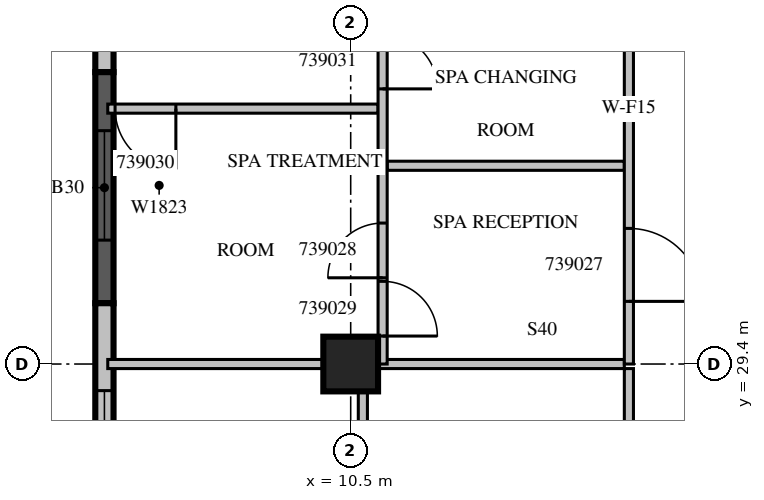
"""IFC4 building model, lengths in metres.
Left out: names, types, materials, properties, quantities, classifications, styles, units other than length and angle.
Written with IfcOpenShell. Run it as: python <this file> out.ifc"""

import sys

from ifc_helpers import new_model, si_unit, direction, frame, frame_2d, origin, origin_2d, place, context, subcontext, project, spatial, rectangle, extrude, source, transform, mapped, element, fill, save


model = new_model("IFC4")
c1 = context("Model", 3, precision=1e-05, world=origin(), true_north=direction((0.0, 1.0)))
c2 = subcontext(c1, "Body", "Model", "MODEL_VIEW")
j1 = project(units=[si_unit("LENGTHUNIT", "METRE"), si_unit("PLANEANGLEUNIT", "RADIAN")], contexts=[c1])
p1 = place(None, origin())
s1 = spatial("IfcSite", under=j1, at=p1, CompositionType="ELEMENT")
p2 = place(p1, origin())
s2 = spatial("IfcBuilding", under=s1, at=p2, CompositionType="ELEMENT")
p3 = place(p2, frame((0.0, 0.0, 181.6)))
s3 = spatial("IfcBuildingStorey", under=s2, at=p3, CompositionType="ELEMENT", Elevation=181.6)
m1 = source(origin(), c2, "Body", "SweptSolid", [
    extrude(rectangle(XDim=0.9, YDim=0.9, at=origin_2d()), origin(), (0.0, 0.0, 1.0), 3.8),
])
p4 = place(p3, frame((10.5, 29.4, 0.0), z_axis=(0.0, 0.0, 1.0), x_axis=(1.0, 0.0, 0.0)))
e1 = element("IfcColumn", 1, at=p4, inside=s3, PredefinedType="COLUMN", context=c2, shape_type="MappedRepresentation", body=[
    mapped(m1, transform((0.0, 0.0, 0.0), scale=1.0)),
])
m2 = source(origin(), c2, "Body", "SweptSolid", [
    extrude(rectangle(XDim=4.2, YDim=0.3, at=frame_2d((2.1, 0.0))), origin(), (0.0, 0.0, 1.0), 3.4),
])
p5 = place(p3, frame((6.45, 38.4, 0.0), z_axis=(0.0, 0.0, 1.0), x_axis=(0.0, -1.0, 0.0)))
e2 = element("IfcWall", 2, at=p5, inside=s3, PredefinedType="STANDARD", context=c2, shape_type="MappedRepresentation", body=[
    mapped(m2, transform((0.0, 0.0, 0.0), scale=1.0)),
])
m3 = source(origin(), c2, "Body", "SweptSolid", [
    extrude(rectangle(XDim=1.8, YDim=2.3, at=frame_2d((0.9, 1.15))), frame((0.0, 0.16, 0.0), z_axis=(0.0, -1.0, 0.0), x_axis=(1.0, 0.0, 0.0)), (0.0, 0.0, 1.0), 0.32),
])
p6 = place(p5, frame((1.15, 0.0, 0.6)))
e3 = element("IfcOpeningElement", 3, at=p6, cuts=e2, PredefinedType="OPENING", context=c2, shape_type="MappedRepresentation", body=[
    mapped(m3, transform((0.0, 0.0, 0.0), scale=1.0)),
])
m4 = source(origin(), c2, "Body", "SweptSolid", [
    extrude(rectangle(XDim=3.8, YDim=0.3, at=frame_2d((1.9, 0.0))), origin(), (0.0, 0.0, 1.0), 3.4),
])
p7 = place(p3, frame((6.45, 34.2, 0.0), z_axis=(0.0, 0.0, 1.0), x_axis=(0.0, -1.0, 0.0)))
e4 = element("IfcWall", 4, at=p7, inside=s3, PredefinedType="SOLIDWALL", context=c2, shape_type="MappedRepresentation", body=[
    mapped(m4, transform((0.0, 0.0, 0.0), scale=1.0)),
])
p8 = place(p7, frame((0.963, 0.0, 0.6)))
e5 = element("IfcOpeningElement", 5, at=p8, cuts=e4, PredefinedType="OPENING", context=c2, shape_type="MappedRepresentation", body=[
    mapped(m3, transform((0.0, 0.0, 0.0), scale=1.0)),
])
p9 = place(p3, frame((6.45, 30.4, 0.0), z_axis=(0.0, 0.0, 1.0), x_axis=(0.0, -1.0, 0.0)))
e6 = element("IfcWall", 6, at=p9, inside=s3, PredefinedType="STANDARD", context=c2, shape_type="SweptSolid", body=[
    extrude(rectangle(XDim=8.6, YDim=0.3, at=frame_2d((4.3, 0.0))), origin(), (0.0, 0.0, 1.0), 3.4),
])
p10 = place(p9, frame((1.438, 0.0, 0.6)))
e7 = element("IfcOpeningElement", 7, at=p10, cuts=e6, PredefinedType="OPENING", context=c2, shape_type="MappedRepresentation", body=[
    mapped(m3, transform((0.0, 0.0, 0.0), scale=1.0)),
])
m5 = source(origin(), c2, "Body", "SweptSolid", [
    extrude(rectangle(XDim=1.2, YDim=2.3, at=frame_2d((0.6, 1.15))), frame((0.0, 0.16, 0.0), z_axis=(0.0, -1.0, 0.0), x_axis=(1.0, 0.0, 0.0)), (0.0, 0.0, 1.0), 0.32),
])
p11 = place(p9, frame((5.013, 0.0, 0.6)))
e8 = element("IfcOpeningElement", 8, at=p11, cuts=e6, PredefinedType="OPENING", context=c2, shape_type="MappedRepresentation", body=[
    mapped(m5, transform((0.0, 0.0, 0.0), scale=1.0)),
])
m6 = source(origin(), c2, "Body", "SweptSolid", [
    extrude(rectangle(XDim=5.176, YDim=0.15, at=frame_2d((2.588, 0.0))), origin(), (0.0, 0.0, 1.0), 3.4),
])
p12 = place(p3, frame((10.7, 23.775, 0.0), z_axis=(0.0, 0.0, 1.0), x_axis=(0.0, 1.0, 0.0)))
e9 = element("IfcWall", 9, at=p12, inside=s3, PredefinedType="PARTITIONING", context=c2, shape_type="MappedRepresentation", body=[
    mapped(m6, transform((0.0, 0.0, 0.0), scale=1.0)),
])
m7 = source(origin(), c2, "Body", "SweptSolid", [
    extrude(rectangle(XDim=5.55, YDim=0.15, at=frame_2d((2.775, 0.0))), origin(), (0.0, 0.0, 1.0), 3.4),
])
p13 = place(p3, frame((15.075, 23.775, 0.0), z_axis=(0.0, 0.0, 1.0), x_axis=(0.0, 1.0, 0.0)))
e10 = element("IfcWall", 10, at=p13, inside=s3, PredefinedType="PARTITIONING", context=c2, shape_type="MappedRepresentation", body=[
    mapped(m7, transform((0.0, 0.0, 0.0), scale=1.0)),
])
m8 = source(origin(), c2, "Body", "SweptSolid", [
    extrude(rectangle(XDim=3.546, YDim=0.15, at=frame_2d((1.773, 0.0))), origin(), (0.0, 0.0, 1.0), 3.4),
])
p14 = place(p3, frame((10.051, 29.4, 0.0), z_axis=(0.0, 0.0, 1.0), x_axis=(-1.0, 0.0, 0.0)))
e11 = element("IfcWall", 11, at=p14, inside=s3, PredefinedType="PARTITIONING", context=c2, shape_type="MappedRepresentation", body=[
    mapped(m8, transform((0.0, 0.0, 0.0), scale=1.0)),
])
m9 = source(origin(), c2, "Body", "SweptSolid", [
    extrude(rectangle(XDim=4.051, YDim=0.15, at=frame_2d((2.026, 0.0))), origin(), (0.0, 0.0, 1.0), 3.4),
])
p15 = place(p3, frame((15.0, 29.4, 0.0), z_axis=(0.0, 0.0, 1.0), x_axis=(-1.0, 0.0, 0.0)))
e12 = element("IfcWall", 12, at=p15, inside=s3, PredefinedType="PARTITIONING", context=c2, shape_type="MappedRepresentation", body=[
    mapped(m9, transform((0.0, 0.0, 0.0), scale=1.0)),
])
m10 = source(origin(), c2, "Body", "SweptSolid", [
    extrude(rectangle(XDim=4.445, YDim=0.15, at=frame_2d((2.223, 0.0))), origin(), (0.0, 0.0, 1.0), 3.4),
])
p16 = place(p3, frame((10.95, 33.6, 0.0), z_axis=(0.0, 0.0, 1.0), x_axis=(-1.0, 0.0, 0.0)))
e13 = element("IfcWall", 13, at=p16, inside=s3, PredefinedType="PARTITIONING", context=c2, shape_type="MappedRepresentation", body=[
    mapped(m10, transform((0.0, 0.0, 0.0), scale=1.0)),
])
m11 = source(origin(), c2, "Body", "SweptSolid", [
    extrude(rectangle(XDim=1.0, YDim=2.1, at=frame_2d((0.5, 1.05))), frame((0.0, 0.085, 0.0), z_axis=(0.0, -1.0, 0.0), x_axis=(1.0, 0.0, 0.0)), (0.0, 0.0, 1.0), 0.17),
])
p17 = place(p16, frame((3.325, 0.0, 0.0)))
e14 = element("IfcOpeningElement", 14, at=p17, cuts=e13, PredefinedType="OPENING", context=c2, shape_type="MappedRepresentation", body=[
    mapped(m11, transform((0.0, 0.0, 0.0), scale=1.0)),
])
m12 = source(origin(), c2, "Body", "SweptSolid", [
    extrude(rectangle(XDim=3.9, YDim=0.15, at=frame_2d((1.95, 0.0))), origin(), (0.0, 0.0, 1.0), 3.4),
])
p18 = place(p3, frame((15.0, 32.66, 0.0), z_axis=(0.0, 0.0, 1.0), x_axis=(-1.0, 0.0, 0.0)))
e15 = element("IfcWall", 15, at=p18, inside=s3, PredefinedType="PARTITIONING", context=c2, shape_type="MappedRepresentation", body=[
    mapped(m12, transform((0.0, 0.0, 0.0), scale=1.0)),
])
m13 = source(origin(), c2, "Body", "SweptSolid", [
    extrude(rectangle(XDim=8.4, YDim=0.15, at=frame_2d((4.2, 0.0))), origin(), (0.0, 0.0, 1.0), 3.4),
])
p19 = place(p3, frame((11.025, 29.4, 0.0), z_axis=(0.0, 0.0, 1.0), x_axis=(0.0, 1.0, 0.0)))
e16 = element("IfcWall", 16, at=p19, inside=s3, PredefinedType="PARTITIONING", context=c2, shape_type="MappedRepresentation", body=[
    mapped(m13, transform((0.0, 0.0, 0.0), scale=1.0)),
])
m14 = source(origin(), c2, "Body", "SweptSolid", [
    extrude(rectangle(XDim=0.9, YDim=2.1, at=frame_2d((0.45, 1.05))), frame((0.0, 0.085, 0.0), z_axis=(0.0, -1.0, 0.0), x_axis=(1.0, 0.0, 0.0)), (0.0, 0.0, 1.0), 0.17),
])
p20 = place(p19, frame((1.418, 0.0, 0.0)))
e17 = element("IfcOpeningElement", 17, at=p20, cuts=e16, PredefinedType="OPENING", context=c2, shape_type="MappedRepresentation", body=[
    mapped(m14, transform((0.0, 0.0, 0.0), scale=1.0)),
])
p21 = place(p19, frame((0.46, 0.0, 0.0)))
e18 = element("IfcOpeningElement", 18, at=p21, cuts=e16, PredefinedType="OPENING", context=c2, shape_type="MappedRepresentation", body=[
    mapped(m14, transform((0.0, 0.0, 0.0), scale=1.0)),
])
p22 = place(p19, frame((4.525, 0.0, 0.0)))
e19 = element("IfcOpeningElement", 19, at=p22, cuts=e16, PredefinedType="OPENING", context=c2, shape_type="MappedRepresentation", body=[
    mapped(m14, transform((0.0, 0.0, 0.0), scale=1.0)),
])
p23 = place(p19, frame((6.387, 0.0, 0.0)))
e20 = element("IfcOpeningElement", 20, at=p23, cuts=e16, PredefinedType="OPENING", context=c2, shape_type="MappedRepresentation", body=[
    mapped(m14, transform((0.0, 0.0, 0.0), scale=1.0)),
])
p24 = place(p3, frame((15.075, 29.4, 0.0), z_axis=(0.0, 0.0, 1.0), x_axis=(0.0, 1.0, 0.0)))
e21 = element("IfcWall", 21, at=p24, inside=s3, PredefinedType="PARTITIONING", context=c2, shape_type="MappedRepresentation", body=[
    mapped(m13, transform((0.0, 0.0, 0.0), scale=1.0)),
])
m15 = source(origin(), c2, "Body", "SweptSolid", [
    extrude(rectangle(XDim=1.2, YDim=2.1, at=frame_2d((0.6, 1.05))), frame((0.0, 0.085, 0.0), z_axis=(0.0, -1.0, 0.0), x_axis=(1.0, 0.0, 0.0)), (0.0, 0.0, 1.0), 0.17),
])
p25 = place(p24, frame((1.03, 0.0, 0.0)))
e22 = element("IfcOpeningElement", 22, at=p25, cuts=e21, PredefinedType="OPENING", context=c2, shape_type="MappedRepresentation", body=[
    mapped(m15, transform((0.0, 0.0, 0.0), scale=1.0)),
])
m16 = source(origin(), c2, "Body", "SweptSolid", [
    extrude(rectangle(XDim=1.8, YDim=2.3, at=frame_2d((0.9, 1.15))), frame((0.0, 0.03, 0.0), z_axis=(0.0, -1.0, 0.0), x_axis=(1.0, 0.0, 0.0)), (0.0, 0.0, 1.0), 0.06),
])
p26 = place(p8, origin())
e23 = element("IfcWindow", 23, at=p26, inside=s3, PartitioningType="SINGLE_PANEL", PredefinedType="WINDOW", context=c2, shape_type="MappedRepresentation", body=[
    mapped(m16, transform((0.0, 0.0, 0.0), scale=1.0)),
])
fill(e5, e23)
p27 = place(p10, origin())
e24 = element("IfcWindow", 24, at=p27, inside=s3, PartitioningType="SINGLE_PANEL", PredefinedType="WINDOW", context=c2, shape_type="MappedRepresentation", body=[
    mapped(m16, transform((0.0, 0.0, 0.0), scale=1.0)),
])
fill(e7, e24)
m17 = source(origin(), c2, "Body", "SweptSolid", [
    extrude(rectangle(XDim=1.2, YDim=2.1, at=frame_2d((0.6, 1.05))), frame((0.0, 0.025, 0.0), z_axis=(0.0, -1.0, 0.0), x_axis=(1.0, 0.0, 0.0)), (0.0, 0.0, 1.0), 0.05),
])
p28 = place(p25, origin())
e25 = element("IfcDoor", 25, at=p28, inside=s3, OperationType="SINGLE_SWING_RIGHT", PredefinedType="DOOR", context=c2, shape_type="MappedRepresentation", body=[
    mapped(m17, transform((0.0, 0.0, 0.0), scale=1.0)),
])
fill(e22, e25)
m18 = source(origin(), c2, "Body", "SweptSolid", [
    extrude(rectangle(XDim=0.9, YDim=2.1, at=frame_2d((0.45, 1.05))), frame((0.0, 0.025, 0.0), z_axis=(0.0, -1.0, 0.0), x_axis=(1.0, 0.0, 0.0)), (0.0, 0.0, 1.0), 0.05),
])
p29 = place(p20, origin())
e26 = element("IfcDoor", 26, at=p29, inside=s3, OperationType="SINGLE_SWING_LEFT", PredefinedType="DOOR", context=c2, shape_type="MappedRepresentation", body=[
    mapped(m18, transform((0.0, 0.0, 0.0), scale=1.0)),
])
fill(e17, e26)
p30 = place(p21, origin())
e27 = element("IfcDoor", 27, at=p30, inside=s3, OperationType="SINGLE_SWING_RIGHT", PredefinedType="DOOR", context=c2, shape_type="MappedRepresentation", body=[
    mapped(m18, transform((0.0, 0.0, 0.0), scale=1.0)),
])
fill(e18, e27)
m19 = source(origin(), c2, "Body", "SweptSolid", [
    extrude(rectangle(XDim=1.0, YDim=2.1, at=frame_2d((0.5, 1.05))), frame((0.0, 0.025, 0.0), z_axis=(0.0, -1.0, 0.0), x_axis=(1.0, 0.0, 0.0)), (0.0, 0.0, 1.0), 0.05),
])
p31 = place(p17, origin())
e28 = element("IfcDoor", 28, at=p31, inside=s3, OperationType="SINGLE_SWING_LEFT", PredefinedType="DOOR", context=c2, shape_type="MappedRepresentation", body=[
    mapped(m19, transform((0.0, 0.0, 0.0), scale=1.0)),
])
fill(e14, e28)
p32 = place(p22, origin())
e29 = element("IfcDoor", 29, at=p32, inside=s3, OperationType="SINGLE_SWING_RIGHT", PredefinedType="DOOR", context=c2, shape_type="MappedRepresentation", body=[
    mapped(m18, transform((0.0, 0.0, 0.0), scale=1.0)),
])
fill(e19, e29)
save(model, sys.argv[1])
